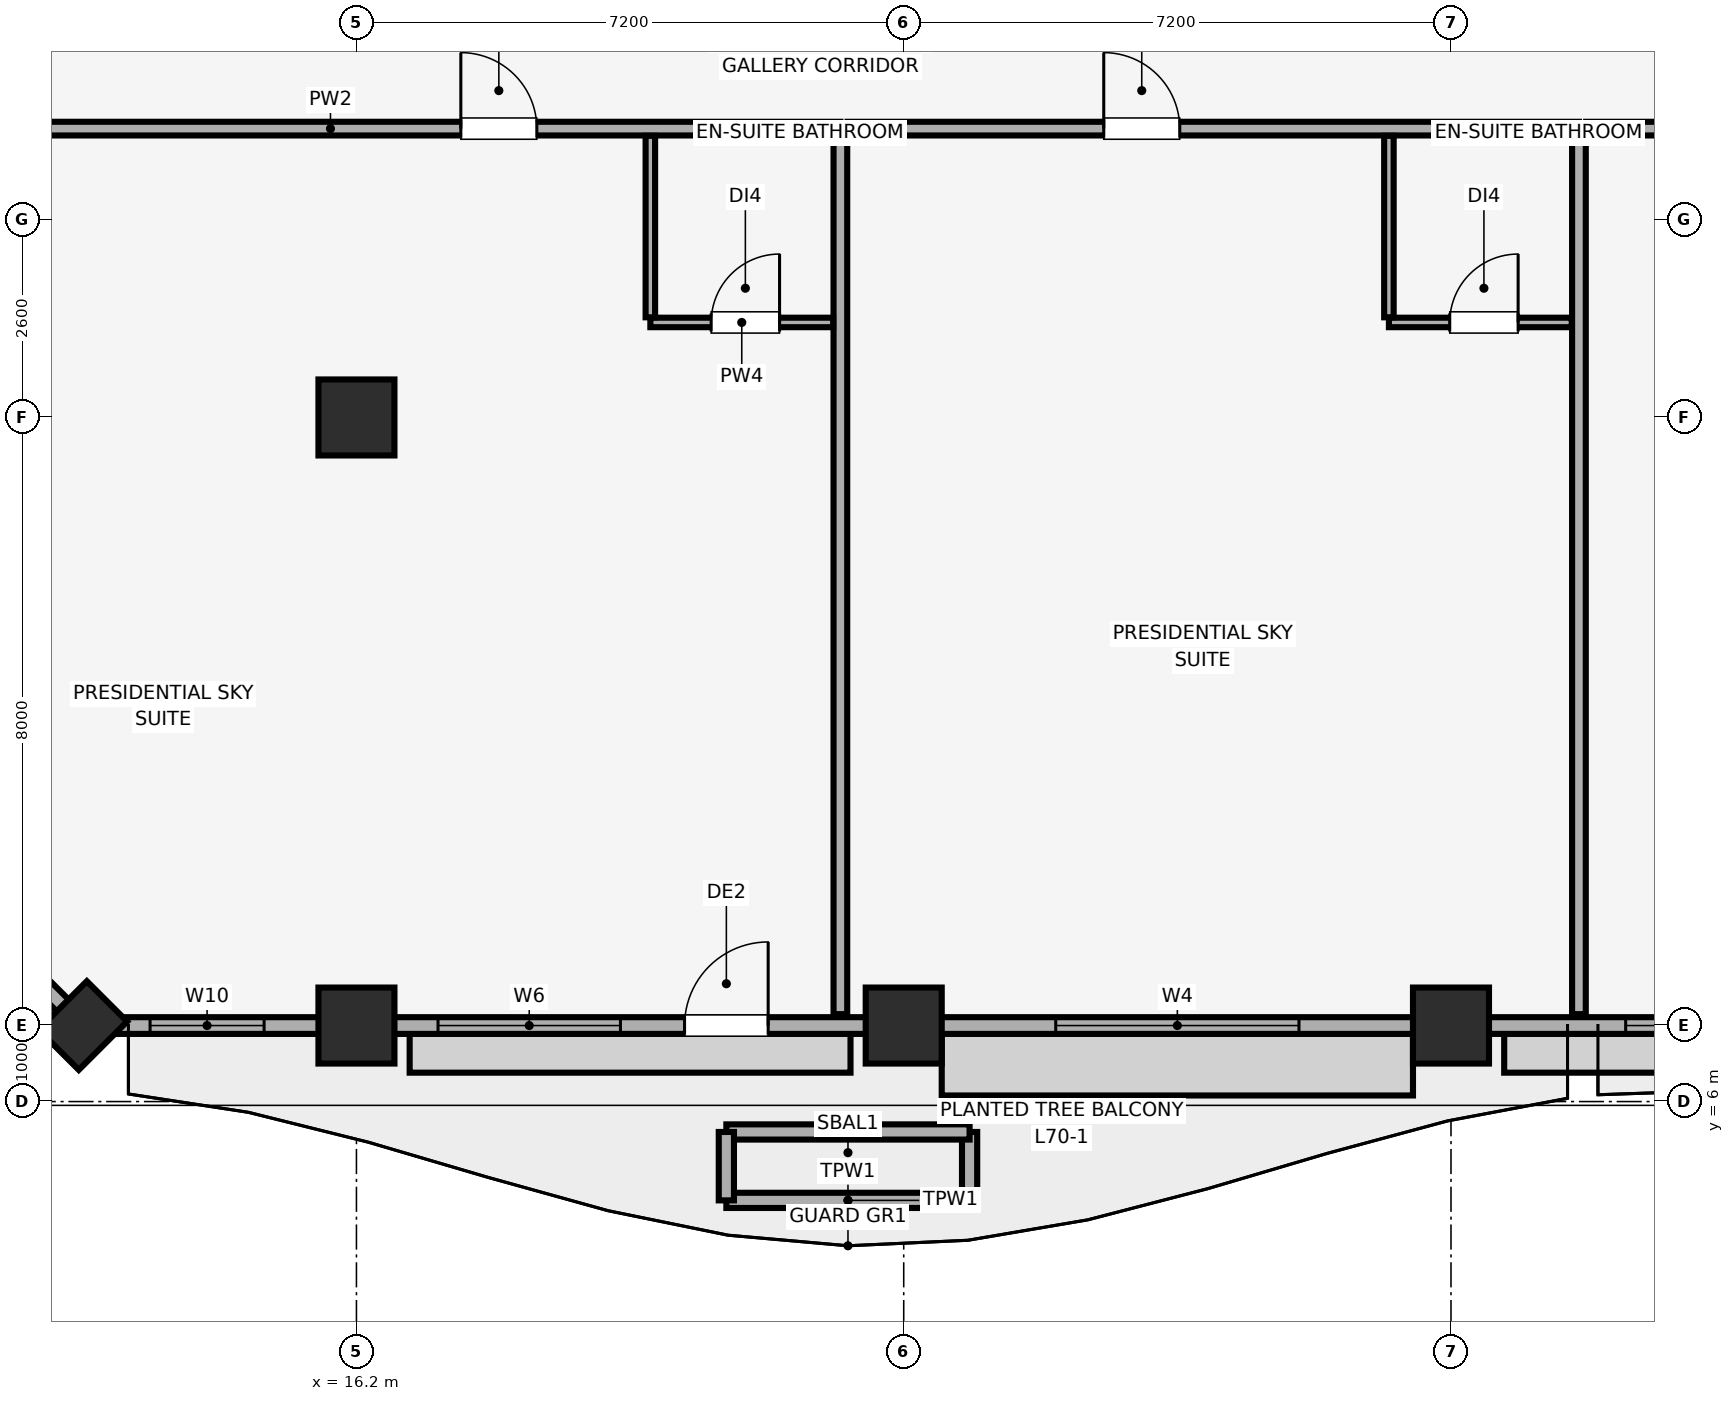
"""IFC4 building model, lengths in metres.
Left out: names, types, materials, properties, quantities, classifications, styles, units other than length and angle.
Written with IfcOpenShell. Run it as: python <this file> out.ifc"""

import sys

from ifc_helpers import new_model, si_unit, direction, frame, frame_2d, origin, origin_2d, place, context, subcontext, project, spatial, rectangle, extrude, element, fill, save


model = new_model("IFC4")
c1 = context("Model", 3, precision=1e-05, world=origin(), true_north=direction((0.0, 1.0)))
c2 = subcontext(c1, "Body", "Model", "MODEL_VIEW")
j1 = project(units=[si_unit("LENGTHUNIT", "METRE"), si_unit("PLANEANGLEUNIT", "RADIAN")], contexts=[c1])
p1 = place(None, origin())
s1 = spatial("IfcSite", under=j1, at=p1, CompositionType="ELEMENT")
p2 = place(p1, origin())
s2 = spatial("IfcBuilding", under=s1, at=p2, CompositionType="ELEMENT")
p3 = place(p2, frame((0.0, 0.0, 285.9)))
s3 = spatial("IfcBuildingStorey", under=s2, at=p3, CompositionType="ELEMENT", Elevation=285.9)
for number, where, z_axis, x_axis in (
    (1, (16.2, 7.0, 0.0), (0.0, 0.0, 1.0), (1.0, 0.0, 0.0)),
    (2, (23.4, 7.0, 0.0), (0.0, 0.0, 1.0), (1.0, 0.0, 0.0)),
    (3, (30.6, 7.0, 0.0), (0.0, 0.0, 1.0), (1.0, 0.0, 0.0)),
):
    element("IfcColumn", number, at=place(p3, frame(where, z_axis=z_axis, x_axis=x_axis)), inside=s3, PredefinedType="COLUMN", context=c2, shape_type="SweptSolid", body=[
        extrude(rectangle(XDim=1.0, YDim=1.0, at=origin_2d()), origin(), (0.0, 0.0, 1.0), 4.1),
    ])
p4 = place(p3, frame((12.6, 7.0, 0.0), z_axis=(0.0, 0.0, 1.0), x_axis=(0.707106781187, 0.707106781187, 0.0)))
e4 = element("IfcColumn", 4, at=p4, inside=s3, PredefinedType="PILASTER", context=c2, shape_type="SweptSolid", body=[
    extrude(rectangle(XDim=0.9, YDim=0.75, at=origin_2d()), origin(), (0.0, 0.0, 1.0), 4.1),
])
p5 = place(p3, frame((16.2, 15.0, 0.0), z_axis=(0.0, 0.0, 1.0), x_axis=(1.0, 0.0, 0.0)))
e5 = element("IfcColumn", 5, at=p5, inside=s3, PredefinedType="COLUMN", context=c2, shape_type="SweptSolid", body=[
    extrude(rectangle(XDim=1.0, YDim=1.0, at=origin_2d()), origin(), (0.0, 0.0, 1.0), 4.1),
])
p6 = place(p3, frame((12.6, 7.0, 0.0), z_axis=(0.0, 0.0, 1.0), x_axis=(1.0, 0.0, 0.0)))
e6 = element("IfcWall", 6, at=p6, inside=s3, PredefinedType="SOLIDWALL", context=c2, shape_type="SweptSolid", body=[
    extrude(rectangle(XDim=58.8, YDim=0.22, at=frame_2d((29.4, 0.0))), origin(), (0.0, 0.0, 1.0), 3.3),
])
p7 = place(p6, frame((7.917, 0.0, 0.0)))
e7 = element("IfcOpeningElement", 7, at=p7, cuts=e6, PredefinedType="OPENING", context=c2, shape_type="SweptSolid", body=[
    extrude(rectangle(XDim=1.1, YDim=2.15, at=frame_2d((0.55, 1.075))), frame((0.0, 0.12, 0.0), z_axis=(0.0, -1.0, 0.0), x_axis=(1.0, 0.0, 0.0)), (0.0, 0.0, 1.0), 0.24),
])
p8 = place(p6, frame((22.583, 0.0, 0.0)))
e8 = element("IfcOpeningElement", 8, at=p8, cuts=e6, PredefinedType="OPENING", context=c2, shape_type="SweptSolid", body=[
    extrude(rectangle(XDim=1.1, YDim=2.15, at=frame_2d((0.55, 1.075))), frame((0.0, 0.12, 0.0), z_axis=(0.0, -1.0, 0.0), x_axis=(1.0, 0.0, 0.0)), (0.0, 0.0, 1.0), 0.24),
])
p9 = place(p6, frame((49.783, 0.0, 0.0)))
e9 = element("IfcOpeningElement", 9, at=p9, cuts=e6, PredefinedType="OPENING", context=c2, shape_type="SweptSolid", body=[
    extrude(rectangle(XDim=1.1, YDim=2.15, at=frame_2d((0.55, 1.075))), frame((0.0, 0.12, 0.0), z_axis=(0.0, -1.0, 0.0), x_axis=(1.0, 0.0, 0.0)), (0.0, 0.0, 1.0), 0.24),
])
p10 = place(p6, frame((0.885, 0.0, 0.85)))
e10 = element("IfcOpeningElement", 10, at=p10, cuts=e6, PredefinedType="OPENING", context=c2, shape_type="SweptSolid", body=[
    extrude(rectangle(XDim=1.5, YDim=1.4, at=frame_2d((0.75, 0.7))), frame((0.0, 0.12, 0.0), z_axis=(0.0, -1.0, 0.0), x_axis=(1.0, 0.0, 0.0)), (0.0, 0.0, 1.0), 0.24),
])
p11 = place(p6, frame((4.673, 0.0, 0.85)))
e11 = element("IfcOpeningElement", 11, at=p11, cuts=e6, PredefinedType="OPENING", context=c2, shape_type="SweptSolid", body=[
    extrude(rectangle(XDim=2.4, YDim=1.5, at=frame_2d((1.2, 0.75))), frame((0.0, 0.12, 0.0), z_axis=(0.0, -1.0, 0.0), x_axis=(1.0, 0.0, 0.0)), (0.0, 0.0, 1.0), 0.24),
])
p12 = place(p6, frame((12.8, 0.0, 0.85)))
e12 = element("IfcOpeningElement", 12, at=p12, cuts=e6, PredefinedType="OPENING", context=c2, shape_type="SweptSolid", body=[
    extrude(rectangle(XDim=3.2, YDim=1.85, at=frame_2d((1.6, 0.925))), frame((0.0, 0.12, 0.0), z_axis=(0.0, -1.0, 0.0), x_axis=(1.0, 0.0, 0.0)), (0.0, 0.0, 1.0), 0.24),
])
p13 = place(p6, frame((20.298, 0.0, 0.85)))
e13 = element("IfcOpeningElement", 13, at=p13, cuts=e6, PredefinedType="OPENING", context=c2, shape_type="SweptSolid", body=[
    extrude(rectangle(XDim=1.5, YDim=1.4, at=frame_2d((0.75, 0.7))), frame((0.0, 0.12, 0.0), z_axis=(0.0, -1.0, 0.0), x_axis=(1.0, 0.0, 0.0)), (0.0, 0.0, 1.0), 0.24),
])
p14 = place(p6, frame((26.3, 0.0, 0.85)))
e14 = element("IfcOpeningElement", 14, at=p14, cuts=e6, PredefinedType="OPENING", context=c2, shape_type="SweptSolid", body=[
    extrude(rectangle(XDim=2.4, YDim=1.5, at=frame_2d((1.2, 0.75))), frame((0.0, 0.12, 0.0), z_axis=(0.0, -1.0, 0.0), x_axis=(1.0, 0.0, 0.0)), (0.0, 0.0, 1.0), 0.24),
])
p15 = place(p6, frame((30.1, 0.0, 0.85)))
e15 = element("IfcOpeningElement", 15, at=p15, cuts=e6, PredefinedType="OPENING", context=c2, shape_type="SweptSolid", body=[
    extrude(rectangle(XDim=2.4, YDim=1.5, at=frame_2d((1.2, 0.75))), frame((0.0, 0.12, 0.0), z_axis=(0.0, -1.0, 0.0), x_axis=(1.0, 0.0, 0.0)), (0.0, 0.0, 1.0), 0.24),
])
p16 = place(p6, frame((34.958, 0.0, 0.85)))
e16 = element("IfcOpeningElement", 16, at=p16, cuts=e6, PredefinedType="OPENING", context=c2, shape_type="SweptSolid", body=[
    extrude(rectangle(XDim=3.2, YDim=1.85, at=frame_2d((1.6, 0.925))), frame((0.0, 0.12, 0.0), z_axis=(0.0, -1.0, 0.0), x_axis=(1.0, 0.0, 0.0)), (0.0, 0.0, 1.0), 0.24),
])
p17 = place(p6, frame((42.8, 0.0, 0.85)))
e17 = element("IfcOpeningElement", 17, at=p17, cuts=e6, PredefinedType="OPENING", context=c2, shape_type="SweptSolid", body=[
    extrude(rectangle(XDim=3.2, YDim=1.85, at=frame_2d((1.6, 0.925))), frame((0.0, 0.12, 0.0), z_axis=(0.0, -1.0, 0.0), x_axis=(1.0, 0.0, 0.0)), (0.0, 0.0, 1.0), 0.24),
])
p18 = place(p6, frame((51.727, 0.0, 0.85)))
e18 = element("IfcOpeningElement", 18, at=p18, cuts=e6, PredefinedType="OPENING", context=c2, shape_type="SweptSolid", body=[
    extrude(rectangle(XDim=2.4, YDim=1.5, at=frame_2d((1.2, 0.75))), frame((0.0, 0.12, 0.0), z_axis=(0.0, -1.0, 0.0), x_axis=(1.0, 0.0, 0.0)), (0.0, 0.0, 1.0), 0.24),
])
p19 = place(p6, frame((56.415, 0.0, 0.85)))
e19 = element("IfcOpeningElement", 19, at=p19, cuts=e6, PredefinedType="OPENING", context=c2, shape_type="SweptSolid", body=[
    extrude(rectangle(XDim=1.5, YDim=1.4, at=frame_2d((0.75, 0.7))), frame((0.0, 0.12, 0.0), z_axis=(0.0, -1.0, 0.0), x_axis=(1.0, 0.0, 0.0)), (0.0, 0.0, 1.0), 0.24),
])
p20 = place(p3, frame((9.0, 10.6, 0.0), z_axis=(0.0, 0.0, 1.0), x_axis=(0.707106781187, -0.707106781187, 0.0)))
e20 = element("IfcWall", 20, at=p20, inside=s3, PredefinedType="SOLIDWALL", context=c2, shape_type="SweptSolid", body=[
    extrude(rectangle(XDim=5.091, YDim=0.22, at=frame_2d((2.546, 0.0))), origin(), (0.0, 0.0, 1.0), 3.3),
])
p21 = place(p20, frame((1.496, 0.0, 0.85)))
e21 = element("IfcOpeningElement", 21, at=p21, cuts=e20, PredefinedType="OPENING", context=c2, shape_type="SweptSolid", body=[
    extrude(rectangle(XDim=2.1, YDim=1.6, at=frame_2d((1.05, 0.8))), frame((0.0, 0.12, 0.0), z_axis=(0.0, -1.0, 0.0), x_axis=(1.0, 0.0, 0.0)), (0.0, 0.0, 1.0), 0.24),
])
p22 = place(p3, frame((21.067, 4.7, 0.0), z_axis=(0.0, 0.0, 1.0), x_axis=(1.0, 0.0, 0.0)))
e22 = element("IfcWall", 22, at=p22, inside=s3, PredefinedType="PARAPET", context=c2, shape_type="SweptSolid", body=[
    extrude(rectangle(XDim=3.2, YDim=0.2, at=frame_2d((1.6, 0.0))), origin(), (0.0, 0.0, 1.0), 0.55),
])
p23 = place(p3, frame((24.267, 4.7, 0.0), z_axis=(0.0, 0.0, 1.0), x_axis=(0.0, 1.0, 0.0)))
e23 = element("IfcWall", 23, at=p23, inside=s3, PredefinedType="PARAPET", context=c2, shape_type="SweptSolid", body=[
    extrude(rectangle(XDim=0.9, YDim=0.2, at=frame_2d((0.45, 0.0))), origin(), (0.0, 0.0, 1.0), 0.55),
])
p24 = place(p3, frame((24.267, 5.6, 0.0), z_axis=(0.0, 0.0, 1.0), x_axis=(-1.0, 0.0, 0.0)))
e24 = element("IfcWall", 24, at=p24, inside=s3, PredefinedType="PARAPET", context=c2, shape_type="SweptSolid", body=[
    extrude(rectangle(XDim=3.2, YDim=0.2, at=frame_2d((1.6, 0.0))), origin(), (0.0, 0.0, 1.0), 0.55),
])
p25 = place(p3, frame((21.067, 5.6, 0.0), z_axis=(0.0, 0.0, 1.0), x_axis=(0.0, -1.0, 0.0)))
e25 = element("IfcWall", 25, at=p25, inside=s3, PredefinedType="PARAPET", context=c2, shape_type="SweptSolid", body=[
    extrude(rectangle(XDim=0.9, YDim=0.2, at=frame_2d((0.45, 0.0))), origin(), (0.0, 0.0, 1.0), 0.55),
])
p26 = place(p3, frame((9.15, 18.8, 0.0), z_axis=(0.0, 0.0, 1.0), x_axis=(1.0, 0.0, 0.0)))
e26 = element("IfcWall", 26, at=p26, inside=s3, PredefinedType="PARTITIONING", context=c2, shape_type="SweptSolid", body=[
    extrude(rectangle(XDim=13.417, YDim=0.18, at=frame_2d((6.708, 0.0))), origin(), (0.0, 0.0, 1.0), 4.1),
])
p27 = place(p26, frame((8.423, 0.0, 0.0)))
e27 = element("IfcOpeningElement", 27, at=p27, cuts=e26, PredefinedType="OPENING", context=c2, shape_type="SweptSolid", body=[
    extrude(rectangle(XDim=1.0, YDim=2.15, at=frame_2d((0.5, 1.075))), frame((0.0, 0.1, 0.0), z_axis=(0.0, -1.0, 0.0), x_axis=(1.0, 0.0, 0.0)), (0.0, 0.0, 1.0), 0.2),
])
p28 = place(p3, frame((22.567, 7.15, 0.0), z_axis=(0.0, 0.0, 1.0), x_axis=(0.0, 1.0, 0.0)))
e28 = element("IfcWall", 28, at=p28, inside=s3, PredefinedType="PARTITIONING", context=c2, shape_type="SweptSolid", body=[
    extrude(rectangle(XDim=11.555, YDim=0.18, at=frame_2d((5.778, 0.0))), origin(), (0.0, 0.0, 1.0), 4.1),
])
p29 = place(p3, frame((20.067, 16.25, 0.0), z_axis=(0.0, 0.0, 1.0), x_axis=(1.0, 0.0, 0.0)))
e29 = element("IfcWall", 29, at=p29, inside=s3, PredefinedType="PARTITIONING", context=c2, shape_type="SweptSolid", body=[
    extrude(rectangle(XDim=2.405, YDim=0.125, at=frame_2d((1.203, 0.0))), origin(), (0.0, 0.0, 1.0), 4.1),
])
p30 = place(p29, frame((0.8, 0.0, 0.0)))
e30 = element("IfcOpeningElement", 30, at=p30, cuts=e29, PredefinedType="OPENING", context=c2, shape_type="SweptSolid", body=[
    extrude(rectangle(XDim=0.9, YDim=2.1, at=frame_2d((0.45, 1.05))), frame((0.0, 0.073, 0.0), z_axis=(0.0, -1.0, 0.0), x_axis=(1.0, 0.0, 0.0)), (0.0, 0.0, 1.0), 0.145),
])
p31 = place(p3, frame((20.067, 16.317, 0.0), z_axis=(0.0, 0.0, 1.0), x_axis=(0.0, 1.0, 0.0)))
e31 = element("IfcWall", 31, at=p31, inside=s3, PredefinedType="PARTITIONING", context=c2, shape_type="SweptSolid", body=[
    extrude(rectangle(XDim=2.388, YDim=0.125, at=frame_2d((1.194, 0.0))), origin(), (0.0, 0.0, 1.0), 4.1),
])
p32 = place(p3, frame((22.662, 18.8, 0.0), z_axis=(0.0, 0.0, 1.0), x_axis=(1.0, 0.0, 0.0)))
e32 = element("IfcWall", 32, at=p32, inside=s3, PredefinedType="PARTITIONING", context=c2, shape_type="SweptSolid", body=[
    extrude(rectangle(XDim=9.622, YDim=0.18, at=frame_2d((4.811, 0.0))), origin(), (0.0, 0.0, 1.0), 4.1),
])
p33 = place(p32, frame((3.37, 0.0, 0.0)))
e33 = element("IfcOpeningElement", 33, at=p33, cuts=e32, PredefinedType="OPENING", context=c2, shape_type="SweptSolid", body=[
    extrude(rectangle(XDim=1.0, YDim=2.15, at=frame_2d((0.5, 1.075))), frame((0.0, 0.1, 0.0), z_axis=(0.0, -1.0, 0.0), x_axis=(1.0, 0.0, 0.0)), (0.0, 0.0, 1.0), 0.2),
])
p34 = place(p3, frame((32.283, 7.15, 0.0), z_axis=(0.0, 0.0, 1.0), x_axis=(0.0, 1.0, 0.0)))
e34 = element("IfcWall", 34, at=p34, inside=s3, PredefinedType="PARTITIONING", context=c2, shape_type="SweptSolid", body=[
    extrude(rectangle(XDim=11.555, YDim=0.18, at=frame_2d((5.778, 0.0))), origin(), (0.0, 0.0, 1.0), 4.1),
])
p35 = place(p3, frame((29.783, 16.25, 0.0), z_axis=(0.0, 0.0, 1.0), x_axis=(1.0, 0.0, 0.0)))
e35 = element("IfcWall", 35, at=p35, inside=s3, PredefinedType="PARTITIONING", context=c2, shape_type="SweptSolid", body=[
    extrude(rectangle(XDim=2.405, YDim=0.125, at=frame_2d((1.203, 0.0))), origin(), (0.0, 0.0, 1.0), 4.1),
])
p36 = place(p35, frame((0.8, 0.0, 0.0)))
e36 = element("IfcOpeningElement", 36, at=p36, cuts=e35, PredefinedType="OPENING", context=c2, shape_type="SweptSolid", body=[
    extrude(rectangle(XDim=0.9, YDim=2.1, at=frame_2d((0.45, 1.05))), frame((0.0, 0.073, 0.0), z_axis=(0.0, -1.0, 0.0), x_axis=(1.0, 0.0, 0.0)), (0.0, 0.0, 1.0), 0.145),
])
p37 = place(p3, frame((29.783, 16.317, 0.0), z_axis=(0.0, 0.0, 1.0), x_axis=(0.0, 1.0, 0.0)))
e37 = element("IfcWall", 37, at=p37, inside=s3, PredefinedType="PARTITIONING", context=c2, shape_type="SweptSolid", body=[
    extrude(rectangle(XDim=2.388, YDim=0.125, at=frame_2d((1.194, 0.0))), origin(), (0.0, 0.0, 1.0), 4.1),
])
p38 = place(p3, frame((32.378, 18.8, 0.0), z_axis=(0.0, 0.0, 1.0), x_axis=(1.0, 0.0, 0.0)))
e38 = element("IfcWall", 38, at=p38, inside=s3, PredefinedType="PARTITIONING", context=c2, shape_type="SweptSolid", body=[
    extrude(rectangle(XDim=9.622, YDim=0.18, at=frame_2d((4.811, 0.0))), origin(), (0.0, 0.0, 1.0), 4.1),
])
p39 = place(p38, frame((1.773, 0.0, 0.0)))
e39 = element("IfcOpeningElement", 39, at=p39, cuts=e38, PredefinedType="OPENING", context=c2, shape_type="SweptSolid", body=[
    extrude(rectangle(XDim=1.0, YDim=2.15, at=frame_2d((0.5, 1.075))), frame((0.0, 0.1, 0.0), z_axis=(0.0, -1.0, 0.0), x_axis=(1.0, 0.0, 0.0)), (0.0, 0.0, 1.0), 0.2),
])
p40 = place(p7, origin())
e40 = element("IfcDoor", 40, at=p40, inside=s3, OperationType="SINGLE_SWING_RIGHT", PredefinedType="DOOR", context=c2, shape_type="SweptSolid", body=[
    extrude(rectangle(XDim=1.1, YDim=2.15, at=frame_2d((0.55, 1.075))), frame((0.0, 0.025, 0.0), z_axis=(0.0, -1.0, 0.0), x_axis=(1.0, 0.0, 0.0)), (0.0, 0.0, 1.0), 0.05),
])
fill(e7, e40)
p41 = place(p10, origin())
e41 = element("IfcWindow", 41, at=p41, inside=s3, PartitioningType="SINGLE_PANEL", PredefinedType="WINDOW", context=c2, shape_type="SweptSolid", body=[
    extrude(rectangle(XDim=1.5, YDim=1.4, at=frame_2d((0.75, 0.7))), frame((0.0, 0.03, 0.0), z_axis=(0.0, -1.0, 0.0), x_axis=(1.0, 0.0, 0.0)), (0.0, 0.0, 1.0), 0.06),
])
fill(e10, e41)
p42 = place(p11, origin())
e42 = element("IfcWindow", 42, at=p42, inside=s3, PartitioningType="SINGLE_PANEL", PredefinedType="WINDOW", context=c2, shape_type="SweptSolid", body=[
    extrude(rectangle(XDim=2.4, YDim=1.5, at=frame_2d((1.2, 0.75))), frame((0.0, 0.03, 0.0), z_axis=(0.0, -1.0, 0.0), x_axis=(1.0, 0.0, 0.0)), (0.0, 0.0, 1.0), 0.06),
])
fill(e11, e42)
p43 = place(p12, origin())
e43 = element("IfcWindow", 43, at=p43, inside=s3, PartitioningType="SINGLE_PANEL", PredefinedType="WINDOW", context=c2, shape_type="SweptSolid", body=[
    extrude(rectangle(XDim=3.2, YDim=1.85, at=frame_2d((1.6, 0.925))), frame((0.0, 0.03, 0.0), z_axis=(0.0, -1.0, 0.0), x_axis=(1.0, 0.0, 0.0)), (0.0, 0.0, 1.0), 0.06),
])
fill(e12, e43)
p44 = place(p13, origin())
e44 = element("IfcWindow", 44, at=p44, inside=s3, PartitioningType="SINGLE_PANEL", PredefinedType="WINDOW", context=c2, shape_type="SweptSolid", body=[
    extrude(rectangle(XDim=1.5, YDim=1.4, at=frame_2d((0.75, 0.7))), frame((0.0, 0.03, 0.0), z_axis=(0.0, -1.0, 0.0), x_axis=(1.0, 0.0, 0.0)), (0.0, 0.0, 1.0), 0.06),
])
fill(e13, e44)
p45 = place(p27, origin())
e45 = element("IfcDoor", 45, at=p45, inside=s3, OperationType="SINGLE_SWING_LEFT", PredefinedType="DOOR", context=c2, shape_type="SweptSolid", body=[
    extrude(rectangle(XDim=1.0, YDim=2.15, at=frame_2d((0.5, 1.075))), frame((0.0, 0.025, 0.0), z_axis=(0.0, -1.0, 0.0), x_axis=(1.0, 0.0, 0.0)), (0.0, 0.0, 1.0), 0.05),
])
fill(e27, e45)
p46 = place(p30, origin())
e46 = element("IfcDoor", 46, at=p46, inside=s3, OperationType="SINGLE_SWING_RIGHT", PredefinedType="DOOR", context=c2, shape_type="SweptSolid", body=[
    extrude(rectangle(XDim=0.9, YDim=2.1, at=frame_2d((0.45, 1.05))), frame((0.0, 0.025, 0.0), z_axis=(0.0, -1.0, 0.0), x_axis=(1.0, 0.0, 0.0)), (0.0, 0.0, 1.0), 0.05),
])
fill(e30, e46)
p47 = place(p33, origin())
e47 = element("IfcDoor", 47, at=p47, inside=s3, OperationType="SINGLE_SWING_LEFT", PredefinedType="DOOR", context=c2, shape_type="SweptSolid", body=[
    extrude(rectangle(XDim=1.0, YDim=2.15, at=frame_2d((0.5, 1.075))), frame((0.0, 0.025, 0.0), z_axis=(0.0, -1.0, 0.0), x_axis=(1.0, 0.0, 0.0)), (0.0, 0.0, 1.0), 0.05),
])
fill(e33, e47)
p48 = place(p36, origin())
e48 = element("IfcDoor", 48, at=p48, inside=s3, OperationType="SINGLE_SWING_RIGHT", PredefinedType="DOOR", context=c2, shape_type="SweptSolid", body=[
    extrude(rectangle(XDim=0.9, YDim=2.1, at=frame_2d((0.45, 1.05))), frame((0.0, 0.025, 0.0), z_axis=(0.0, -1.0, 0.0), x_axis=(1.0, 0.0, 0.0)), (0.0, 0.0, 1.0), 0.05),
])
fill(e36, e48)
save(model, sys.argv[1])
